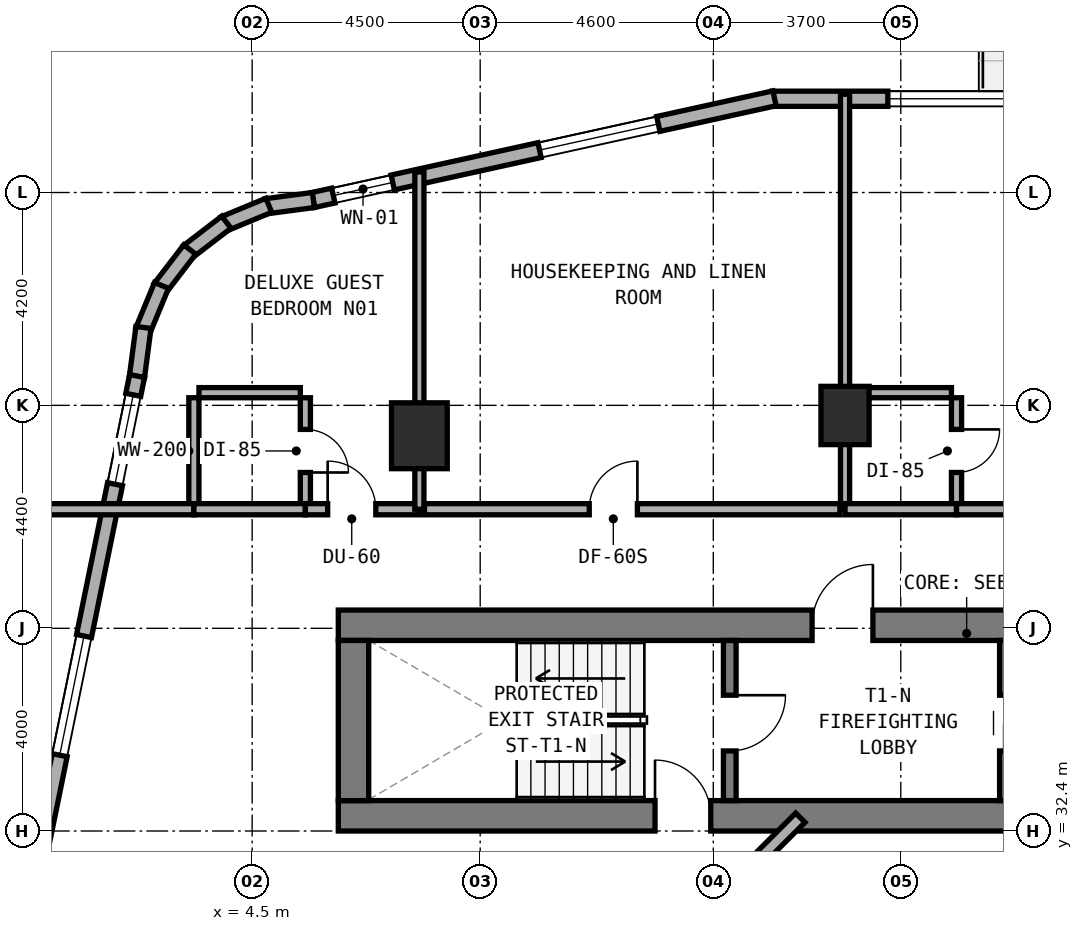
"""IFC4 building model, lengths in metres.
Left out: names, types, materials, properties, quantities, classifications, styles, units other than length and angle.
Written with IfcOpenShell. Run it as: python <this file> out.ifc"""

import sys

from ifc_helpers import new_model, si_unit, direction, frame, frame_2d, origin, origin_2d, place, context, subcontext, project, spatial, rectangle, extrude, element, fill, save


model = new_model("IFC4")
c1 = context("Model", 3, precision=1e-05, world=origin(), true_north=direction((0.0, 1.0)))
c2 = subcontext(c1, "Body", "Model", "MODEL_VIEW")
j1 = project(units=[si_unit("LENGTHUNIT", "METRE"), si_unit("PLANEANGLEUNIT", "RADIAN")], contexts=[c1])
p1 = place(None, origin())
s1 = spatial("IfcSite", under=j1, at=p1, CompositionType="ELEMENT")
p2 = place(p1, origin())
s2 = spatial("IfcBuilding", under=s1, at=p2, CompositionType="ELEMENT")
p3 = place(p2, frame((0.0, 0.0, 48.5)))
s3 = spatial("IfcBuildingStorey", under=s2, at=p3, CompositionType="ELEMENT", Elevation=48.5)
p4 = place(p3, frame((6.2, 32.7, 0.0), z_axis=(0.0, 0.0, 1.0), x_axis=(1.0, 0.0, 0.0)))
e1 = element("IfcWall", 1, at=p4, inside=s3, PredefinedType="SHEAR", context=c2, shape_type="SweptSolid", body=[
    extrude(rectangle(XDim=24.8, YDim=0.6, at=frame_2d((12.4, 0.0))), origin(), (0.0, 0.0, 1.0), 3.5),
])
p5 = place(p4, frame((6.25, 0.0, 0.0)))
e2 = element("IfcOpeningElement", 2, at=p5, cuts=e1, PredefinedType="OPENING", context=c2, shape_type="SweptSolid", body=[
    extrude(rectangle(XDim=1.1, YDim=2.15, at=frame_2d((0.55, 1.075))), frame((0.0, 0.31, 0.0), z_axis=(0.0, -1.0, 0.0), x_axis=(1.0, 0.0, 0.0)), (0.0, 0.0, 1.0), 0.62),
])
p6 = place(p3, frame((6.2, 36.46, 0.0), z_axis=(0.0, 0.0, 1.0), x_axis=(1.0, 0.0, 0.0)))
e3 = element("IfcWall", 3, at=p6, inside=s3, PredefinedType="SHEAR", context=c2, shape_type="SweptSolid", body=[
    extrude(rectangle(XDim=24.8, YDim=0.6, at=frame_2d((12.4, 0.0))), origin(), (0.0, 0.0, 1.0), 3.5),
])
p7 = place(p6, frame((9.35, 0.0, 0.0)))
e4 = element("IfcOpeningElement", 4, at=p7, cuts=e3, PredefinedType="OPENING", context=c2, shape_type="SweptSolid", body=[
    extrude(rectangle(XDim=1.2, YDim=2.15, at=frame_2d((0.6, 1.075))), frame((0.0, 0.31, 0.0), z_axis=(0.0, -1.0, 0.0), x_axis=(1.0, 0.0, 0.0)), (0.0, 0.0, 1.0), 0.62),
])
p8 = place(p6, frame((17.14, 0.0, 0.0)))
e5 = element("IfcOpeningElement", 5, at=p8, cuts=e3, PredefinedType="OPENING", context=c2, shape_type="SweptSolid", body=[
    extrude(rectangle(XDim=0.85, YDim=2.1, at=frame_2d((0.425, 1.05))), frame((0.0, 0.31, 0.0), z_axis=(0.0, -1.0, 0.0), x_axis=(1.0, 0.0, 0.0)), (0.0, 0.0, 1.0), 0.62),
])
p9 = place(p6, frame((18.983, 0.0, 0.0)))
e6 = element("IfcOpeningElement", 6, at=p9, cuts=e3, PredefinedType="OPENING", context=c2, shape_type="SweptSolid", body=[
    extrude(rectangle(XDim=1.1, YDim=2.15, at=frame_2d((0.55, 1.075))), frame((0.0, 0.31, 0.0), z_axis=(0.0, -1.0, 0.0), x_axis=(1.0, 0.0, 0.0)), (0.0, 0.0, 1.0), 0.62),
])
p10 = place(p6, frame((20.85, 0.0, 0.0)))
e7 = element("IfcOpeningElement", 7, at=p10, cuts=e3, PredefinedType="OPENING", context=c2, shape_type="SweptSolid", body=[
    extrude(rectangle(XDim=1.1, YDim=2.15, at=frame_2d((0.55, 1.075))), frame((0.0, 0.31, 0.0), z_axis=(0.0, -1.0, 0.0), x_axis=(1.0, 0.0, 0.0)), (0.0, 0.0, 1.0), 0.62),
])
p11 = place(p6, frame((22.716, 0.0, 0.0)))
e8 = element("IfcOpeningElement", 8, at=p11, cuts=e3, PredefinedType="OPENING", context=c2, shape_type="SweptSolid", body=[
    extrude(rectangle(XDim=1.1, YDim=2.15, at=frame_2d((0.55, 1.075))), frame((0.0, 0.31, 0.0), z_axis=(0.0, -1.0, 0.0), x_axis=(1.0, 0.0, 0.0)), (0.0, 0.0, 1.0), 0.62),
])
p12 = place(p3, frame((6.5, 33.0, 0.0), z_axis=(0.0, 0.0, 1.0), x_axis=(0.0, 1.0, 0.0)))
e9 = element("IfcWall", 9, at=p12, inside=s3, PredefinedType="SHEAR", context=c2, shape_type="SweptSolid", body=[
    extrude(rectangle(XDim=3.16, YDim=0.6, at=frame_2d((1.58, 0.0))), origin(), (0.0, 0.0, 1.0), 3.5),
])
p13 = place(p3, frame((13.925, 33.0, 0.0), z_axis=(0.0, 0.0, 1.0), x_axis=(0.0, 1.0, 0.0)))
e10 = element("IfcWall", 10, at=p13, inside=s3, PredefinedType="STANDARD", context=c2, shape_type="SweptSolid", body=[
    extrude(rectangle(XDim=3.16, YDim=0.25, at=frame_2d((1.58, 0.0))), origin(), (0.0, 0.0, 1.0), 3.22),
])
p14 = place(p13, frame((0.98, 0.0, 0.0)))
e11 = element("IfcOpeningElement", 11, at=p14, cuts=e10, PredefinedType="OPENING", context=c2, shape_type="SweptSolid", body=[
    extrude(rectangle(XDim=1.1, YDim=2.15, at=frame_2d((0.55, 1.075))), frame((0.0, 0.135, 0.0), z_axis=(0.0, -1.0, 0.0), x_axis=(1.0, 0.0, 0.0)), (0.0, 0.0, 1.0), 0.27),
])
p15 = place(p3, frame((19.375, 33.0, 0.0), z_axis=(0.0, 0.0, 1.0), x_axis=(0.0, 1.0, 0.0)))
e12 = element("IfcWall", 12, at=p15, inside=s3, PredefinedType="STANDARD", context=c2, shape_type="SweptSolid", body=[
    extrude(rectangle(XDim=3.16, YDim=0.25, at=frame_2d((1.58, 0.0))), origin(), (0.0, 0.0, 1.0), 3.22),
])
p16 = place(p15, frame((0.98, 0.0, 0.0)))
e13 = element("IfcOpeningElement", 13, at=p16, cuts=e12, PredefinedType="OPENING", context=c2, shape_type="SweptSolid", body=[
    extrude(rectangle(XDim=1.1, YDim=2.15, at=frame_2d((0.55, 1.075))), frame((0.0, 0.135, 0.0), z_axis=(0.0, -1.0, 0.0), x_axis=(1.0, 0.0, 0.0)), (0.0, 0.0, 1.0), 0.27),
])
p17 = place(p3, frame((16.2, 40.6, 0.0), z_axis=(0.0, 0.0, 1.0), x_axis=(1.0, 0.0, 0.0)))
e14 = element("IfcColumn", 14, at=p17, inside=s3, PredefinedType="COLUMN", context=c2, shape_type="SweptSolid", body=[
    extrude(rectangle(XDim=0.95, YDim=1.15, at=origin_2d()), origin(), (0.0, 0.0, 1.0), 3.5),
])
p18 = place(p3, frame((7.8, 40.2, 0.0), z_axis=(0.0, 0.0, 1.0), x_axis=(1.0, 0.0, 0.0)))
e15 = element("IfcColumn", 15, at=p18, inside=s3, PredefinedType="COLUMN", context=c2, shape_type="SweptSolid", body=[
    extrude(rectangle(XDim=1.1, YDim=1.3, at=origin_2d()), origin(), (0.0, 0.0, 1.0), 3.5),
])
p19 = place(p3, frame((27.353, 46.85, 0.0), z_axis=(0.0, 0.0, 1.0), x_axis=(-1.0, 0.0, 0.0)))
e16 = element("IfcWall", 16, at=p19, inside=s3, PredefinedType="STANDARD", context=c2, shape_type="SweptSolid", body=[
    extrude(rectangle(XDim=12.591, YDim=0.3, at=frame_2d((6.295, 0.0))), origin(), (0.0, 0.0, 1.0), 3.22),
])
p20 = place(p19, frame((5.713, 0.0, 0.0)))
e17 = element("IfcOpeningElement", 17, at=p20, cuts=e16, PredefinedType="OPENING", context=c2, shape_type="SweptSolid", body=[
    extrude(rectangle(XDim=1.2, YDim=2.15, at=frame_2d((0.6, 1.075))), frame((0.0, 0.16, 0.0), z_axis=(0.0, -1.0, 0.0), x_axis=(1.0, 0.0, 0.0)), (0.0, 0.0, 1.0), 0.32),
])
p21 = place(p19, frame((1.552, 0.0, 0.8)))
e18 = element("IfcOpeningElement", 18, at=p21, cuts=e16, PredefinedType="OPENING", context=c2, shape_type="SweptSolid", body=[
    extrude(rectangle(XDim=2.4, YDim=1.6, at=frame_2d((1.2, 0.8))), frame((0.0, 0.16, 0.0), z_axis=(0.0, -1.0, 0.0), x_axis=(1.0, 0.0, 0.0)), (0.0, 0.0, 1.0), 0.32),
])
p22 = place(p19, frame((7.908, 0.0, 0.8)))
e19 = element("IfcOpeningElement", 19, at=p22, cuts=e16, PredefinedType="OPENING", context=c2, shape_type="SweptSolid", body=[
    extrude(rectangle(XDim=2.4, YDim=1.6, at=frame_2d((1.2, 0.8))), frame((0.0, 0.16, 0.0), z_axis=(0.0, -1.0, 0.0), x_axis=(1.0, 0.0, 0.0)), (0.0, 0.0, 1.0), 0.32),
])
p23 = place(p3, frame((14.808, 46.859, 0.0), z_axis=(0.0, 0.0, 1.0), x_axis=(-0.976555357219, -0.21526642629, 0.0)))
e20 = element("IfcWall", 20, at=p23, inside=s3, PredefinedType="STANDARD", context=c2, shape_type="SweptSolid", body=[
    extrude(rectangle(XDim=9.323, YDim=0.3, at=frame_2d((4.661, 0.0))), origin(), (0.0, 0.0, 1.0), 3.22),
])
p24 = place(p23, frame((2.348, 0.0, 0.8)))
e21 = element("IfcOpeningElement", 21, at=p24, cuts=e20, PredefinedType="OPENING", context=c2, shape_type="SweptSolid", body=[
    extrude(rectangle(XDim=2.4, YDim=1.6, at=frame_2d((1.2, 0.8))), frame((0.0, 0.16, 0.0), z_axis=(0.0, -1.0, 0.0), x_axis=(1.0, 0.0, 0.0)), (0.0, 0.0, 1.0), 0.32),
])
p25 = place(p23, frame((7.715, 0.0, 0.85)))
e22 = element("IfcOpeningElement", 22, at=p25, cuts=e20, PredefinedType="OPENING", context=c2, shape_type="SweptSolid", body=[
    extrude(rectangle(XDim=1.2, YDim=1.5, at=frame_2d((0.6, 0.75))), frame((0.0, 0.16, 0.0), z_axis=(0.0, -1.0, 0.0), x_axis=(1.0, 0.0, 0.0)), (0.0, 0.0, 1.0), 0.32),
])
p26 = place(p3, frame((5.708, 44.852, 0.0), z_axis=(0.0, 0.0, 1.0), x_axis=(-0.991359246108, -0.131174864804, 0.0)))
e23 = element("IfcWall", 23, at=p26, inside=s3, PredefinedType="STANDARD", context=c2, shape_type="SweptSolid", body=[
    extrude(rectangle(XDim=0.938, YDim=0.3, at=frame_2d((0.469, 0.0))), origin(), (0.0, 0.0, 1.0), 3.22),
])
p27 = place(p3, frame((4.828, 44.748, 0.0), z_axis=(0.0, 0.0, 1.0), x_axis=(-0.923982547689, -0.382434636986, 0.0)))
e24 = element("IfcWall", 24, at=p27, inside=s3, PredefinedType="STANDARD", context=c2, shape_type="SweptSolid", body=[
    extrude(rectangle(XDim=0.954, YDim=0.3, at=frame_2d((0.477, 0.0))), origin(), (0.0, 0.0, 1.0), 3.22),
])
for number, where, z_axis, x_axis in (
    (25, (3.991, 44.414, 0.0), (0.0, 0.0, 1.0), (-0.794, -0.608, 0.0)),
    (26, (3.268, 43.875, 0.0), (0.0, 0.0, 1.0), (-0.608, -0.794, 0.0)),
):
    element("IfcWall", number, at=place(p3, frame(where, z_axis=z_axis, x_axis=x_axis)), inside=s3, PredefinedType="STANDARD", context=c2, shape_type="SweptSolid", body=[
        extrude(rectangle(XDim=0.955, YDim=0.3, at=frame_2d((0.478, 0.0))), origin(), (0.0, 0.0, 1.0), 3.22),
    ])
p28 = place(p3, frame((2.711, 43.166, 0.0), z_axis=(0.0, 0.0, 1.0), x_axis=(-0.382344263057, -0.924019948111, 0.0)))
e27 = element("IfcWall", 27, at=p28, inside=s3, PredefinedType="STANDARD", context=c2, shape_type="SweptSolid", body=[
    extrude(rectangle(XDim=0.955, YDim=0.3, at=frame_2d((0.477, 0.0))), origin(), (0.0, 0.0, 1.0), 3.22),
])
p29 = place(p3, frame((2.355, 42.337, 0.0), z_axis=(0.0, 0.0, 1.0), x_axis=(-0.130454512571, -0.991454295543, 0.0)))
e28 = element("IfcWall", 28, at=p29, inside=s3, PredefinedType="STANDARD", context=c2, shape_type="SweptSolid", body=[
    extrude(rectangle(XDim=0.973, YDim=0.3, at=frame_2d((0.487, 0.0))), origin(), (0.0, 0.0, 1.0), 3.22),
])
p30 = place(p3, frame((2.229, 41.378, 0.0), z_axis=(0.0, 0.0, 1.0), x_axis=(-0.199990901713, -0.979797754249, 0.0)))
e29 = element("IfcWall", 29, at=p30, inside=s3, PredefinedType="STANDARD", context=c2, shape_type="SweptSolid", body=[
    extrude(rectangle(XDim=10.065, YDim=0.3, at=frame_2d((5.033, 0.0))), origin(), (0.0, 0.0, 1.0), 3.22),
])
p31 = place(p30, frame((0.378, 0.0, 0.85)))
e30 = element("IfcOpeningElement", 30, at=p31, cuts=e29, PredefinedType="OPENING", context=c2, shape_type="SweptSolid", body=[
    extrude(rectangle(XDim=1.8, YDim=1.5, at=frame_2d((0.9, 0.75))), frame((0.0, 0.16, 0.0), z_axis=(0.0, -1.0, 0.0), x_axis=(1.0, 0.0, 0.0)), (0.0, 0.0, 1.0), 0.32),
])
p32 = place(p30, frame((5.236, 0.0, 0.8)))
e31 = element("IfcOpeningElement", 31, at=p32, cuts=e29, PredefinedType="OPENING", context=c2, shape_type="SweptSolid", body=[
    extrude(rectangle(XDim=2.4, YDim=1.6, at=frame_2d((1.2, 0.8))), frame((0.0, 0.16, 0.0), z_axis=(0.0, -1.0, 0.0), x_axis=(1.0, 0.0, 0.0)), (0.0, 0.0, 1.0), 0.32),
])
p33 = place(p3, frame((15.318, 32.662, 0.0), z_axis=(0.0, 0.0, 1.0), x_axis=(-0.707106781187, -0.707106781187, 0.0)))
e32 = element("IfcWall", 32, at=p33, inside=s3, PredefinedType="STANDARD", context=c2, shape_type="SweptSolid", body=[
    extrude(rectangle(XDim=2.594, YDim=0.26, at=frame_2d((1.297, 0.0))), origin(), (0.0, 0.0, 1.0), 3.22),
])
p34 = place(p3, frame((5.55, 38.85, 0.0), z_axis=(0.0, 0.0, 1.0), x_axis=(0.0, 1.0, 0.0)))
e33 = element("IfcWall", 33, at=p34, inside=s3, PredefinedType="PLUMBINGWALL", context=c2, shape_type="SweptSolid", body=[
    extrude(rectangle(XDim=2.1, YDim=0.2, at=frame_2d((1.05, 0.0))), origin(), (0.0, 0.0, 1.0), 3.22),
])
p35 = place(p34, frame((0.625, 0.0, 0.0)))
e34 = element("IfcOpeningElement", 34, at=p35, cuts=e33, PredefinedType="OPENING", context=c2, shape_type="SweptSolid", body=[
    extrude(rectangle(XDim=0.85, YDim=2.1, at=frame_2d((0.425, 1.05))), frame((0.0, 0.11, 0.0), z_axis=(0.0, -1.0, 0.0), x_axis=(1.0, 0.0, 0.0)), (0.0, 0.0, 1.0), 0.22),
])
p36 = place(p3, frame((3.45, 41.05, 0.0), z_axis=(0.0, 0.0, 1.0), x_axis=(1.0, 0.0, 0.0)))
e35 = element("IfcWall", 35, at=p36, inside=s3, PredefinedType="PLUMBINGWALL", context=c2, shape_type="SweptSolid", body=[
    extrude(rectangle(XDim=2.0, YDim=0.2, at=frame_2d((1.0, 0.0))), origin(), (0.0, 0.0, 1.0), 3.22),
])
p37 = place(p3, frame((3.35, 38.85, 0.0), z_axis=(0.0, 0.0, 1.0), x_axis=(0.0, 1.0, 0.0)))
e36 = element("IfcWall", 36, at=p37, inside=s3, PredefinedType="PLUMBINGWALL", context=c2, shape_type="SweptSolid", body=[
    extrude(rectangle(XDim=2.1, YDim=0.2, at=frame_2d((1.05, 0.0))), origin(), (0.0, 0.0, 1.0), 3.22),
])
p38 = place(p3, frame((0.24, 38.75, 0.0), z_axis=(0.0, 0.0, 1.0), x_axis=(1.0, 0.0, 0.0)))
e37 = element("IfcWall", 37, at=p38, inside=s3, PredefinedType="SOLIDWALL", context=c2, shape_type="SweptSolid", body=[
    extrude(rectangle(XDim=3.11, YDim=0.22, at=frame_2d((1.555, 0.0))), origin(), (0.0, 0.0, 1.0), 3.22),
])
p39 = place(p3, frame((3.35, 38.75, 0.0), z_axis=(0.0, 0.0, 1.0), x_axis=(1.0, 0.0, 0.0)))
e38 = element("IfcWall", 38, at=p39, inside=s3, PredefinedType="SOLIDWALL", context=c2, shape_type="SweptSolid", body=[
    extrude(rectangle(XDim=2.2, YDim=0.22, at=frame_2d((1.1, 0.0))), origin(), (0.0, 0.0, 1.0), 3.22),
])
p40 = place(p3, frame((5.55, 38.75, 0.0), z_axis=(0.0, 0.0, 1.0), x_axis=(1.0, 0.0, 0.0)))
e39 = element("IfcWall", 39, at=p40, inside=s3, PredefinedType="SOLIDWALL", context=c2, shape_type="SweptSolid", body=[
    extrude(rectangle(XDim=2.25, YDim=0.22, at=frame_2d((1.125, 0.0))), origin(), (0.0, 0.0, 1.0), 2.395),
])
p41 = place(p40, frame((0.44, 0.0, 0.0)))
e40 = element("IfcOpeningElement", 40, at=p41, cuts=e39, PredefinedType="OPENING", context=c2, shape_type="SweptSolid", body=[
    extrude(rectangle(XDim=0.95, YDim=2.1, at=frame_2d((0.475, 1.05))), frame((0.0, 0.12, 0.0), z_axis=(0.0, -1.0, 0.0), x_axis=(1.0, 0.0, 0.0)), (0.0, 0.0, 1.0), 0.24),
])
p42 = place(p3, frame((7.8, 38.75, 0.0), z_axis=(0.0, 0.0, 1.0), x_axis=(0.0, 1.0, 0.0)))
e41 = element("IfcWall", 41, at=p42, inside=s3, PredefinedType="SOLIDWALL", context=c2, shape_type="SweptSolid", body=[
    extrude(rectangle(XDim=6.656, YDim=0.18, at=frame_2d((3.328, 0.0))), origin(), (0.0, 0.0, 1.0), 2.395),
])
p43 = place(p3, frame((7.9, 38.75, 0.0), z_axis=(0.0, 0.0, 1.0), x_axis=(1.0, 0.0, 0.0)))
e42 = element("IfcWall", 42, at=p43, inside=s3, PredefinedType="SOLIDWALL", context=c2, shape_type="SweptSolid", body=[
    extrude(rectangle(XDim=8.2, YDim=0.22, at=frame_2d((4.1, 0.0))), origin(), (0.0, 0.0, 1.0), 2.955),
])
p44 = place(p43, frame((3.252, 0.0, 0.0)))
e43 = element("IfcOpeningElement", 43, at=p44, cuts=e42, PredefinedType="OPENING", context=c2, shape_type="SweptSolid", body=[
    extrude(rectangle(XDim=0.95, YDim=2.1, at=frame_2d((0.475, 1.05))), frame((0.0, 0.12, 0.0), z_axis=(0.0, -1.0, 0.0), x_axis=(1.0, 0.0, 0.0)), (0.0, 0.0, 1.0), 0.24),
])
p45 = place(p3, frame((16.2, 38.75, 0.0), z_axis=(0.0, 0.0, 1.0), x_axis=(0.0, 1.0, 0.0)))
e44 = element("IfcWall", 44, at=p45, inside=s3, PredefinedType="SOLIDWALL", context=c2, shape_type="SweptSolid", body=[
    extrude(rectangle(XDim=8.19, YDim=0.18, at=frame_2d((4.095, 0.0))), origin(), (0.0, 0.0, 1.0), 2.395),
])
p46 = place(p3, frame((18.4, 38.85, 0.0), z_axis=(0.0, 0.0, 1.0), x_axis=(0.0, 1.0, 0.0)))
e45 = element("IfcWall", 45, at=p46, inside=s3, PredefinedType="PLUMBINGWALL", context=c2, shape_type="SweptSolid", body=[
    extrude(rectangle(XDim=2.1, YDim=0.2, at=frame_2d((1.05, 0.0))), origin(), (0.0, 0.0, 1.0), 2.745),
])
p47 = place(p46, frame((0.625, 0.0, 0.0)))
e46 = element("IfcOpeningElement", 46, at=p47, cuts=e45, PredefinedType="OPENING", context=c2, shape_type="SweptSolid", body=[
    extrude(rectangle(XDim=0.85, YDim=2.1, at=frame_2d((0.425, 1.05))), frame((0.0, 0.11, 0.0), z_axis=(0.0, -1.0, 0.0), x_axis=(1.0, 0.0, 0.0)), (0.0, 0.0, 1.0), 0.22),
])
p48 = place(p3, frame((16.3, 41.05, 0.0), z_axis=(0.0, 0.0, 1.0), x_axis=(1.0, 0.0, 0.0)))
e47 = element("IfcWall", 47, at=p48, inside=s3, PredefinedType="PLUMBINGWALL", context=c2, shape_type="SweptSolid", body=[
    extrude(rectangle(XDim=2.0, YDim=0.2, at=frame_2d((1.0, 0.0))), origin(), (0.0, 0.0, 1.0), 3.22),
])
p49 = place(p3, frame((16.2, 38.75, 0.0), z_axis=(0.0, 0.0, 1.0), x_axis=(1.0, 0.0, 0.0)))
e48 = element("IfcWall", 48, at=p49, inside=s3, PredefinedType="SOLIDWALL", context=c2, shape_type="SweptSolid", body=[
    extrude(rectangle(XDim=2.2, YDim=0.22, at=frame_2d((1.1, 0.0))), origin(), (0.0, 0.0, 1.0), 2.395),
])
p50 = place(p3, frame((18.4, 38.75, 0.0), z_axis=(0.0, 0.0, 1.0), x_axis=(1.0, 0.0, 0.0)))
e49 = element("IfcWall", 49, at=p50, inside=s3, PredefinedType="SOLIDWALL", context=c2, shape_type="SweptSolid", body=[
    extrude(rectangle(XDim=11.8, YDim=0.22, at=frame_2d((5.9, 0.0))), origin(), (0.0, 0.0, 1.0), 2.395),
])
p51 = place(p50, frame((5.425, 0.0, 0.0)))
e50 = element("IfcOpeningElement", 50, at=p51, cuts=e49, PredefinedType="OPENING", context=c2, shape_type="SweptSolid", body=[
    extrude(rectangle(XDim=0.95, YDim=2.1, at=frame_2d((0.475, 1.05))), frame((0.0, 0.12, 0.0), z_axis=(0.0, -1.0, 0.0), x_axis=(1.0, 0.0, 0.0)), (0.0, 0.0, 1.0), 0.24),
])
p52 = place(p22, origin())
e51 = element("IfcWindow", 51, at=p52, inside=s3, PartitioningType="SINGLE_PANEL", PredefinedType="WINDOW", context=c2, shape_type="SweptSolid", body=[
    extrude(rectangle(XDim=2.4, YDim=1.6, at=frame_2d((1.2, 0.8))), frame((0.0, 0.03, 0.0), z_axis=(0.0, -1.0, 0.0), x_axis=(1.0, 0.0, 0.0)), (0.0, 0.0, 1.0), 0.06),
])
fill(e19, e51)
p53 = place(p24, origin())
e52 = element("IfcWindow", 52, at=p53, inside=s3, PartitioningType="SINGLE_PANEL", PredefinedType="WINDOW", context=c2, shape_type="SweptSolid", body=[
    extrude(rectangle(XDim=2.4, YDim=1.6, at=frame_2d((1.2, 0.8))), frame((0.0, 0.03, 0.0), z_axis=(0.0, -1.0, 0.0), x_axis=(1.0, 0.0, 0.0)), (0.0, 0.0, 1.0), 0.06),
])
fill(e21, e52)
p54 = place(p25, origin())
e53 = element("IfcWindow", 53, at=p54, inside=s3, PartitioningType="SINGLE_PANEL", PredefinedType="WINDOW", context=c2, shape_type="SweptSolid", body=[
    extrude(rectangle(XDim=1.2, YDim=1.5, at=frame_2d((0.6, 0.75))), frame((0.0, 0.03, 0.0), z_axis=(0.0, -1.0, 0.0), x_axis=(1.0, 0.0, 0.0)), (0.0, 0.0, 1.0), 0.06),
])
fill(e22, e53)
p55 = place(p31, origin())
e54 = element("IfcWindow", 54, at=p55, inside=s3, PartitioningType="SINGLE_PANEL", PredefinedType="WINDOW", context=c2, shape_type="SweptSolid", body=[
    extrude(rectangle(XDim=1.8, YDim=1.5, at=frame_2d((0.9, 0.75))), frame((0.0, 0.03, 0.0), z_axis=(0.0, -1.0, 0.0), x_axis=(1.0, 0.0, 0.0)), (0.0, 0.0, 1.0), 0.06),
])
fill(e30, e54)
p56 = place(p32, origin())
e55 = element("IfcWindow", 55, at=p56, inside=s3, PartitioningType="SINGLE_PANEL", PredefinedType="WINDOW", context=c2, shape_type="SweptSolid", body=[
    extrude(rectangle(XDim=2.4, YDim=1.6, at=frame_2d((1.2, 0.8))), frame((0.0, 0.03, 0.0), z_axis=(0.0, -1.0, 0.0), x_axis=(1.0, 0.0, 0.0)), (0.0, 0.0, 1.0), 0.06),
])
fill(e31, e55)
p57 = place(p14, frame((1.1, 0.0, 0.0), z_axis=(0.0, 0.0, 1.0), x_axis=(-1.0, 0.0, 0.0)))
e56 = element("IfcDoor", 56, at=p57, inside=s3, OperationType="SINGLE_SWING_LEFT", PredefinedType="DOOR", context=c2, shape_type="SweptSolid", body=[
    extrude(rectangle(XDim=1.1, YDim=2.15, at=frame_2d((0.55, 1.075))), frame((0.0, 0.025, 0.0), z_axis=(0.0, -1.0, 0.0), x_axis=(1.0, 0.0, 0.0)), (0.0, 0.0, 1.0), 0.05),
])
fill(e11, e56)
p58 = place(p7, origin())
e57 = element("IfcDoor", 57, at=p58, inside=s3, OperationType="SINGLE_SWING_RIGHT", PredefinedType="DOOR", context=c2, shape_type="SweptSolid", body=[
    extrude(rectangle(XDim=1.2, YDim=2.15, at=frame_2d((0.6, 1.075))), frame((0.0, 0.025, 0.0), z_axis=(0.0, -1.0, 0.0), x_axis=(1.0, 0.0, 0.0)), (0.0, 0.0, 1.0), 0.05),
])
fill(e4, e57)
p59 = place(p5, origin())
e58 = element("IfcDoor", 58, at=p59, inside=s3, OperationType="SINGLE_SWING_LEFT", PredefinedType="DOOR", context=c2, shape_type="SweptSolid", body=[
    extrude(rectangle(XDim=1.1, YDim=2.15, at=frame_2d((0.55, 1.075))), frame((0.0, 0.025, 0.0), z_axis=(0.0, -1.0, 0.0), x_axis=(1.0, 0.0, 0.0)), (0.0, 0.0, 1.0), 0.05),
])
fill(e2, e58)
p60 = place(p35, frame((0.85, 0.0, 0.0), z_axis=(0.0, 0.0, 1.0), x_axis=(-1.0, 0.0, 0.0)))
e59 = element("IfcDoor", 59, at=p60, inside=s3, OperationType="SINGLE_SWING_RIGHT", PredefinedType="DOOR", context=c2, shape_type="SweptSolid", body=[
    extrude(rectangle(XDim=0.85, YDim=2.1, at=frame_2d((0.425, 1.05))), frame((0.0, 0.025, 0.0), z_axis=(0.0, -1.0, 0.0), x_axis=(1.0, 0.0, 0.0)), (0.0, 0.0, 1.0), 0.05),
])
fill(e34, e59)
p61 = place(p41, origin())
e60 = element("IfcDoor", 60, at=p61, inside=s3, OperationType="SINGLE_SWING_LEFT", PredefinedType="DOOR", context=c2, shape_type="SweptSolid", body=[
    extrude(rectangle(XDim=0.95, YDim=2.1, at=frame_2d((0.475, 1.05))), frame((0.0, 0.025, 0.0), z_axis=(0.0, -1.0, 0.0), x_axis=(1.0, 0.0, 0.0)), (0.0, 0.0, 1.0), 0.05),
])
fill(e40, e60)
p62 = place(p44, origin())
e61 = element("IfcDoor", 61, at=p62, inside=s3, OperationType="SINGLE_SWING_RIGHT", PredefinedType="DOOR", context=c2, shape_type="SweptSolid", body=[
    extrude(rectangle(XDim=0.95, YDim=2.1, at=frame_2d((0.475, 1.05))), frame((0.0, 0.025, 0.0), z_axis=(0.0, -1.0, 0.0), x_axis=(1.0, 0.0, 0.0)), (0.0, 0.0, 1.0), 0.05),
])
fill(e43, e61)
p63 = place(p47, frame((0.85, 0.0, 0.0), z_axis=(0.0, 0.0, 1.0), x_axis=(-1.0, 0.0, 0.0)))
e62 = element("IfcDoor", 62, at=p63, inside=s3, OperationType="SINGLE_SWING_LEFT", PredefinedType="DOOR", context=c2, shape_type="SweptSolid", body=[
    extrude(rectangle(XDim=0.85, YDim=2.1, at=frame_2d((0.425, 1.05))), frame((0.0, 0.025, 0.0), z_axis=(0.0, -1.0, 0.0), x_axis=(1.0, 0.0, 0.0)), (0.0, 0.0, 1.0), 0.05),
])
fill(e46, e62)
save(model, sys.argv[1])
